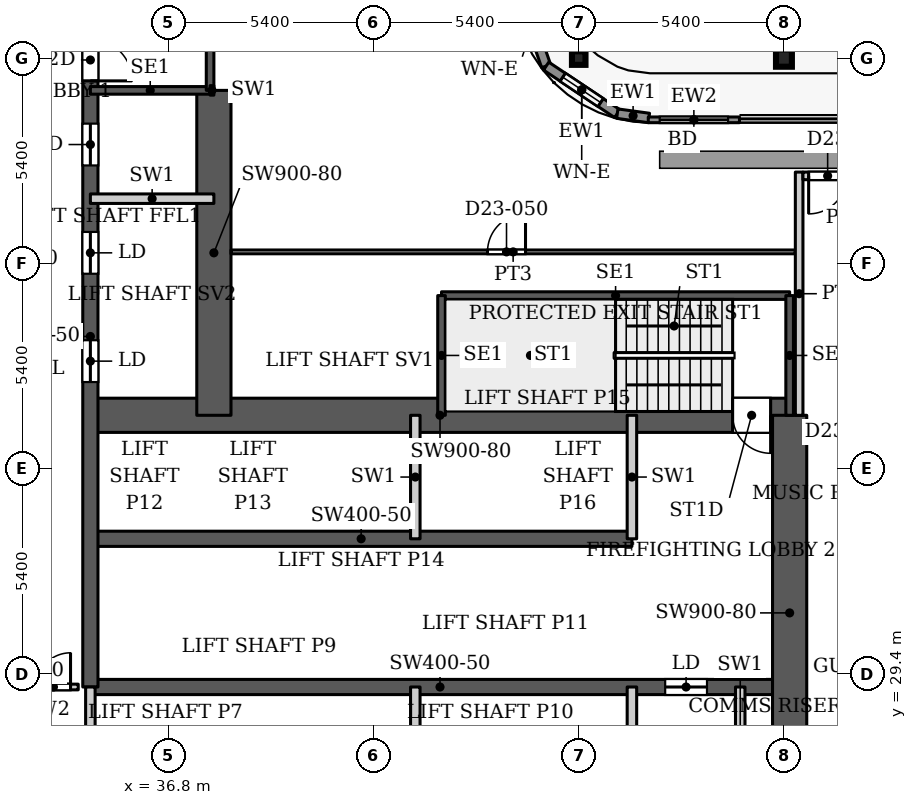
"""IFC4 building model, lengths in metres.
Left out: names, types, materials, properties, quantities, classifications, styles, units other than length and angle.
Written with IfcOpenShell. Run it as: python <this file> out.ifc"""

import sys

from ifc_helpers import new_model, si_unit, direction, frame, frame_2d, origin, origin_2d, place, context, subcontext, project, spatial, rectangle, hollow_rectangle, i_section, extrude, source, transform, mapped, element, fill, save


model = new_model("IFC4")
c1 = context("Model", 3, precision=1e-05, world=origin(), true_north=direction((0.0, 1.0)))
c2 = subcontext(c1, "Body", "Model", "MODEL_VIEW")
j1 = project(units=[si_unit("LENGTHUNIT", "METRE"), si_unit("PLANEANGLEUNIT", "RADIAN")], contexts=[c1])
p1 = place(None, origin())
s1 = spatial("IfcSite", under=j1, at=p1, CompositionType="ELEMENT")
p2 = place(p1, origin())
s2 = spatial("IfcBuilding", under=s1, at=p2, CompositionType="ELEMENT")
p3 = place(p2, frame((0.0, 0.0, 101.9)))
s3 = spatial("IfcBuildingStorey", under=s2, at=p3, CompositionType="ELEMENT", Elevation=101.9)
p4 = place(p3, frame((53.0, 45.6, 0.0), z_axis=(0.0, 0.0, 1.0), x_axis=(1.0, 0.0, 0.0)))
e1 = element("IfcColumn", 1, at=p4, inside=s3, PredefinedType="COLUMN", context=c2, shape_type="SweptSolid", body=[
    extrude(i_section(OverallWidth=0.418, OverallDepth=0.455, WebThickness=0.042, FlangeThickness=0.068, FilletRadius=0.014, at=origin_2d()), origin(), (0.0, 0.0, 1.0), 3.9),
])
p5 = place(p3, frame((47.6, 45.6, 0.0), z_axis=(0.0, 0.0, 1.0), x_axis=(1.0, 0.0, 0.0)))
e2 = element("IfcColumn", 2, at=p5, inside=s3, PredefinedType="COLUMN", context=c2, shape_type="SweptSolid", body=[
    extrude(hollow_rectangle(XDim=0.356, YDim=0.356, WallThickness=0.016, InnerFilletRadius=0.016, OuterFilletRadius=0.032, at=origin_2d()), origin(), (0.0, 0.0, 1.0), 3.9),
])
p6 = place(p3, frame((34.75, 29.05, 0.0), z_axis=(0.0, 0.0, 1.0), x_axis=(1.0, 0.0, 0.0)))
e3 = element("IfcWall", 3, at=p6, inside=s3, PredefinedType="SHEAR", context=c2, shape_type="SweptSolid", body=[
    extrude(rectangle(XDim=18.4, YDim=0.4, at=frame_2d((9.2, 0.0))), origin(), (0.0, 0.0, 1.0), 3.9),
])
p7 = place(p6, frame((15.125, 0.0, 0.0)))
e4 = element("IfcOpeningElement", 4, at=p7, cuts=e3, PredefinedType="OPENING", context=c2, shape_type="SweptSolid", body=[
    extrude(rectangle(XDim=1.1, YDim=2.2, at=frame_2d((0.55, 1.1))), frame((0.0, 0.21, 0.0), z_axis=(0.0, -1.0, 0.0), x_axis=(1.0, 0.0, 0.0)), (0.0, 0.0, 1.0), 0.42),
])
p8 = place(p3, frame((34.75, 32.95, 0.0), z_axis=(0.0, 0.0, 1.0), x_axis=(1.0, 0.0, 0.0)))
e5 = element("IfcWall", 5, at=p8, inside=s3, PredefinedType="SHEAR", context=c2, shape_type="SweptSolid", body=[
    extrude(rectangle(XDim=14.25, YDim=0.4, at=frame_2d((7.125, 0.0))), origin(), (0.0, 0.0, 1.0), 3.9),
])
p9 = place(p3, frame((34.75, 36.2, 0.0), z_axis=(0.0, 0.0, 1.0), x_axis=(1.0, 0.0, 0.0)))
e6 = element("IfcWall", 6, at=p9, inside=s3, PredefinedType="SHEAR", context=c2, shape_type="SweptSolid", body=[
    extrude(rectangle(XDim=18.4, YDim=0.9, at=frame_2d((9.2, 0.0))), origin(), (0.0, 0.0, 1.0), 3.9),
])
p10 = place(p9, frame((16.9, 0.0, 0.0)))
e7 = element("IfcOpeningElement", 7, at=p10, cuts=e6, PredefinedType="OPENING", context=c2, shape_type="SweptSolid", body=[
    extrude(rectangle(XDim=1.0, YDim=2.2, at=frame_2d((0.5, 1.1))), frame((0.0, 0.46, 0.0), z_axis=(0.0, -1.0, 0.0), x_axis=(1.0, 0.0, 0.0)), (0.0, 0.0, 1.0), 0.92),
])
p11 = place(p3, frame((34.75, 29.05, 0.0), z_axis=(0.0, 0.0, 1.0), x_axis=(0.0, 1.0, 0.0)))
e8 = element("IfcWall", 8, at=p11, inside=s3, PredefinedType="SHEAR", context=c2, shape_type="SweptSolid", body=[
    extrude(rectangle(XDim=18.45, YDim=0.4, at=frame_2d((9.225, 0.0))), origin(), (0.0, 0.0, 1.0), 3.9),
])
p12 = place(p11, frame((8.025, 0.0, 0.0)))
e9 = element("IfcOpeningElement", 9, at=p12, cuts=e8, PredefinedType="OPENING", context=c2, shape_type="SweptSolid", body=[
    extrude(rectangle(XDim=1.1, YDim=2.2, at=frame_2d((0.55, 1.1))), frame((0.0, 0.21, 0.0), z_axis=(0.0, -1.0, 0.0), x_axis=(1.0, 0.0, 0.0)), (0.0, 0.0, 1.0), 0.42),
])
p13 = place(p11, frame((10.875, 0.0, 0.0)))
e10 = element("IfcOpeningElement", 10, at=p13, cuts=e8, PredefinedType="OPENING", context=c2, shape_type="SweptSolid", body=[
    extrude(rectangle(XDim=1.1, YDim=2.2, at=frame_2d((0.55, 1.1))), frame((0.0, 0.21, 0.0), z_axis=(0.0, -1.0, 0.0), x_axis=(1.0, 0.0, 0.0)), (0.0, 0.0, 1.0), 0.42),
])
p14 = place(p11, frame((13.725, 0.0, 0.0)))
e11 = element("IfcOpeningElement", 11, at=p14, cuts=e8, PredefinedType="OPENING", context=c2, shape_type="SweptSolid", body=[
    extrude(rectangle(XDim=1.1, YDim=2.2, at=frame_2d((0.55, 1.1))), frame((0.0, 0.21, 0.0), z_axis=(0.0, -1.0, 0.0), x_axis=(1.0, 0.0, 0.0)), (0.0, 0.0, 1.0), 0.42),
])
p15 = place(p11, frame((15.95, 0.0, 0.0)))
e12 = element("IfcOpeningElement", 12, at=p15, cuts=e8, PredefinedType="OPENING", context=c2, shape_type="SweptSolid", body=[
    extrude(rectangle(XDim=1.1, YDim=2.2, at=frame_2d((0.55, 1.1))), frame((0.0, 0.21, 0.0), z_axis=(0.0, -1.0, 0.0), x_axis=(1.0, 0.0, 0.0)), (0.0, 0.0, 1.0), 0.42),
])
p16 = place(p3, frame((38.0, 36.2, 0.0), z_axis=(0.0, 0.0, 1.0), x_axis=(0.0, 1.0, 0.0)))
e13 = element("IfcWall", 13, at=p16, inside=s3, PredefinedType="SHEAR", context=c2, shape_type="SweptSolid", body=[
    extrude(rectangle(XDim=8.55, YDim=0.9, at=frame_2d((4.275, 0.0))), origin(), (0.0, 0.0, 1.0), 3.9),
])
p17 = place(p3, frame((53.15, 25.8, 0.0), z_axis=(0.0, 0.0, 1.0), x_axis=(0.0, 1.0, 0.0)))
e14 = element("IfcWall", 14, at=p17, inside=s3, PredefinedType="SHEAR", context=c2, shape_type="SweptSolid", body=[
    extrude(rectangle(XDim=10.4, YDim=0.9, at=frame_2d((5.2, 0.0))), origin(), (0.0, 0.0, 1.0), 3.9),
])
p18 = place(p3, frame((46.018, 47.471, 0.0), z_axis=(0.0, 0.0, 1.0), x_axis=(0.328791208903, -0.944402637093, 0.0)))
e15 = element("IfcWall", 15, at=p18, inside=s3, PredefinedType="SOLIDWALL", context=c2, shape_type="SweptSolid", body=[
    extrude(rectangle(XDim=2.205, YDim=0.25, at=frame_2d((1.102, 0.0))), origin(), (0.0, 0.0, 1.0), 3.75),
])
p19 = place(p18, frame((0.503, 0.0, 0.6)))
e16 = element("IfcOpeningElement", 16, at=p19, cuts=e15, PredefinedType="OPENING", context=c2, shape_type="SweptSolid", body=[
    extrude(rectangle(XDim=1.2, YDim=2.1, at=frame_2d((0.6, 1.05))), frame((0.0, 0.135, 0.0), z_axis=(0.0, -1.0, 0.0), x_axis=(1.0, 0.0, 0.0)), (0.0, 0.0, 1.0), 0.27),
])
p20 = place(p3, frame((46.743, 45.389, 0.0), z_axis=(0.0, 0.0, 1.0), x_axis=(0.831449265529, -0.555600682912, 0.0)))
e17 = element("IfcWall", 17, at=p20, inside=s3, PredefinedType="SOLIDWALL", context=c2, shape_type="SweptSolid", body=[
    extrude(rectangle(XDim=2.251, YDim=0.25, at=frame_2d((1.126, 0.0))), origin(), (0.0, 0.0, 1.0), 3.75),
])
p21 = place(p20, frame((0.525, 0.0, 0.6)))
e18 = element("IfcOpeningElement", 18, at=p21, cuts=e17, PredefinedType="OPENING", context=c2, shape_type="SweptSolid", body=[
    extrude(rectangle(XDim=1.2, YDim=2.1, at=frame_2d((0.6, 1.05))), frame((0.0, 0.135, 0.0), z_axis=(0.0, -1.0, 0.0), x_axis=(1.0, 0.0, 0.0)), (0.0, 0.0, 1.0), 0.27),
])
p22 = place(p3, frame((48.615, 44.138, 0.0), z_axis=(0.0, 0.0, 1.0), x_axis=(0.990741504246, -0.135761819977, 0.0)))
e19 = element("IfcWall", 19, at=p22, inside=s3, PredefinedType="SOLIDWALL", context=c2, shape_type="SweptSolid", body=[
    extrude(rectangle(XDim=0.84, YDim=0.25, at=frame_2d((0.42, 0.0))), origin(), (0.0, 0.0, 1.0), 3.75),
])
p23 = place(p3, frame((49.43, 43.975, 0.0), z_axis=(0.0, 0.0, 1.0), x_axis=(1.0, 0.0, 0.0)))
e20 = element("IfcWall", 20, at=p23, inside=s3, PredefinedType="SOLIDWALL", context=c2, shape_type="SweptSolid", body=[
    extrude(rectangle(XDim=2.4, YDim=0.15, at=frame_2d((1.2, 0.0))), origin(), (0.0, 0.0, 1.0), 3.75),
])
p24 = place(p23, frame((0.3, 0.0, 0.0)))
e21 = element("IfcOpeningElement", 21, at=p24, cuts=e20, PredefinedType="OPENING", context=c2, shape_type="SweptSolid", body=[
    extrude(rectangle(XDim=1.8, YDim=2.4, at=frame_2d((0.9, 1.2))), frame((0.0, 0.085, 0.0), z_axis=(0.0, -1.0, 0.0), x_axis=(1.0, 0.0, 0.0)), (0.0, 0.0, 1.0), 0.17),
])
p25 = place(p3, frame((43.99, 39.35, 0.0), z_axis=(0.0, 0.0, 1.0), x_axis=(1.0, 0.0, 0.0)))
e22 = element("IfcWall", 22, at=p25, inside=s3, PredefinedType="SHEAR", context=c2, shape_type="SweptSolid", body=[
    extrude(rectangle(XDim=9.16, YDim=0.2, at=frame_2d((4.58, 0.0))), origin(), (0.0, 0.0, 1.0), 3.9),
])
for number, where, z_axis, x_axis in (
    (23, (43.99, 36.2, 0.0), (0.0, 0.0, 1.0), (0.0, 1.0, 0.0)),
    (24, (53.15, 36.2, 0.0), (0.0, 0.0, 1.0), (0.0, 1.0, 0.0)),
):
    element("IfcWall", number, at=place(p3, frame(where, z_axis=z_axis, x_axis=x_axis)), inside=s3, PredefinedType="SHEAR", context=c2, shape_type="SweptSolid", body=[
        extrude(rectangle(XDim=3.15, YDim=0.2, at=frame_2d((1.575, 0.0))), origin(), (0.0, 0.0, 1.0), 3.9),
    ])
p26 = place(p3, frame((34.75, 44.75, 0.0), z_axis=(0.0, 0.0, 1.0), x_axis=(1.0, 0.0, 0.0)))
e25 = element("IfcWall", 25, at=p26, inside=s3, PredefinedType="SHEAR", context=c2, shape_type="SweptSolid", body=[
    extrude(rectangle(XDim=3.15, YDim=0.2, at=frame_2d((1.575, 0.0))), origin(), (0.0, 0.0, 1.0), 3.9),
])
p27 = place(p3, frame((37.9, 44.75, 0.0), z_axis=(0.0, 0.0, 1.0), x_axis=(0.0, 1.0, 0.0)))
e26 = element("IfcWall", 26, at=p27, inside=s3, PredefinedType="SHEAR", context=c2, shape_type="SweptSolid", body=[
    extrude(rectangle(XDim=9.16, YDim=0.2, at=frame_2d((4.58, 0.0))), origin(), (0.0, 0.0, 1.0), 3.9),
])
for number, where, z_axis, x_axis in (
    (27, (34.75, 25.8, 0.0), (0.0, 0.0, 1.0), (0.0, 1.0, 0.0)),
    (28, (43.3, 25.8, 0.0), (0.0, 0.0, 1.0), (0.0, 1.0, 0.0)),
    (29, (43.3, 32.95, 0.0), (0.0, 0.0, 1.0), (0.0, 1.0, 0.0)),
    (30, (49.0, 25.8, 0.0), (0.0, 0.0, 1.0), (0.0, 1.0, 0.0)),
    (31, (49.0, 32.95, 0.0), (0.0, 0.0, 1.0), (0.0, 1.0, 0.0)),
    (32, (51.85, 25.8, 0.0), (0.0, 0.0, 1.0), (0.0, 1.0, 0.0)),
    (33, (34.75, 41.9, 0.0), (0.0, 0.0, 1.0), (1.0, 0.0, 0.0)),
):
    element("IfcWall", number, at=place(p3, frame(where, z_axis=z_axis, x_axis=x_axis)), inside=s3, PredefinedType="PARTITIONING", context=c2, shape_type="SweptSolid", body=[
        extrude(rectangle(XDim=3.25, YDim=0.25, at=frame_2d((1.625, 0.0))), origin(), (0.0, 0.0, 1.0), 3.9),
    ])
p28 = place(p3, frame((37.9, 44.75, 0.0), z_axis=(0.0, 0.0, 1.0), x_axis=(1.0, 0.0, 0.0)))
e34 = element("IfcWall", 34, at=p28, inside=s3, PredefinedType="PARTITIONING", context=c2, shape_type="SweptSolid", body=[
    extrude(rectangle(XDim=0.1, YDim=0.25, at=frame_2d((0.05, 0.0))), origin(), (0.0, 0.0, 1.0), 3.9),
])
p29 = place(p3, frame((32.805, 29.05, 0.0), z_axis=(0.0, 0.0, 1.0), x_axis=(1.0, 0.0, 0.0)))
e35 = element("IfcWall", 35, at=p29, inside=s3, PredefinedType="PARTITIONING", context=c2, shape_type="SweptSolid", body=[
    extrude(rectangle(XDim=1.625, YDim=0.15, at=frame_2d((0.812, 0.0))), origin(), (0.0, 0.0, 1.0), 3.9),
])
p30 = place(p29, frame((0.523, 0.0, 0.0)))
e36 = element("IfcOpeningElement", 36, at=p30, cuts=e35, PredefinedType="OPENING", context=c2, shape_type="SweptSolid", body=[
    extrude(rectangle(XDim=0.9, YDim=2.2, at=frame_2d((0.45, 1.1))), frame((0.0, 0.085, 0.0), z_axis=(0.0, -1.0, 0.0), x_axis=(1.0, 0.0, 0.0)), (0.0, 0.0, 1.0), 0.17),
])
p31 = place(p3, frame((38.449, 40.5, 0.0), z_axis=(0.0, 0.0, 1.0), x_axis=(1.0, 0.0, 0.0)))
e37 = element("IfcWall", 37, at=p31, inside=s3, PredefinedType="PARTITIONING", context=c2, shape_type="SweptSolid", body=[
    extrude(rectangle(XDim=14.851, YDim=0.1, at=frame_2d((7.426, 0.0))), origin(), (0.0, 0.0, 1.0), 3.6),
])
p32 = place(p31, frame((6.751, 0.0, 0.0)))
e38 = element("IfcOpeningElement", 38, at=p32, cuts=e37, PredefinedType="OPENING", context=c2, shape_type="SweptSolid", body=[
    extrude(rectangle(XDim=1.0, YDim=2.1, at=frame_2d((0.5, 1.05))), frame((0.0, 0.06, 0.0), z_axis=(0.0, -1.0, 0.0), x_axis=(1.0, 0.0, 0.0)), (0.0, 0.0, 1.0), 0.12),
])
p33 = place(p3, frame((53.4, 36.199, 0.0), z_axis=(0.0, 0.0, 1.0), x_axis=(0.0, 1.0, 0.0)))
e39 = element("IfcWall", 39, at=p33, inside=s3, PredefinedType="PARTITIONING", context=c2, shape_type="SweptSolid", body=[
    extrude(rectangle(XDim=6.401, YDim=0.2, at=frame_2d((3.201, 0.0))), origin(), (0.0, 0.0, 1.0), 3.6),
])
p34 = place(p3, frame((53.5, 42.5, 0.0), z_axis=(0.0, 0.0, 1.0), x_axis=(1.0, 0.0, 0.0)))
e40 = element("IfcWall", 40, at=p34, inside=s3, PredefinedType="PARTITIONING", context=c2, shape_type="SweptSolid", body=[
    extrude(rectangle(XDim=2.2, YDim=0.2, at=frame_2d((1.1, 0.0))), origin(), (0.0, 0.0, 1.0), 3.6),
])
p35 = place(p34, frame((0.15, 0.0, 0.0)))
e41 = element("IfcOpeningElement", 41, at=p35, cuts=e40, PredefinedType="OPENING", context=c2, shape_type="SweptSolid", body=[
    extrude(rectangle(XDim=1.0, YDim=2.1, at=frame_2d((0.5, 1.05))), frame((0.0, 0.11, 0.0), z_axis=(0.0, -1.0, 0.0), x_axis=(1.0, 0.0, 0.0)), (0.0, 0.0, 1.0), 0.22),
])
m1 = source(origin(), c2, "Body", "SweptSolid", [
    extrude(rectangle(XDim=1.2, YDim=2.1, at=frame_2d((0.6, 1.05))), frame((0.0, 0.03, 0.0), z_axis=(0.0, -1.0, 0.0), x_axis=(1.0, 0.0, 0.0)), (0.0, 0.0, 1.0), 0.06),
])
p36 = place(p21, origin())
e42 = element("IfcWindow", 42, at=p36, inside=s3, PartitioningType="SINGLE_PANEL", PredefinedType="WINDOW", context=c2, shape_type="MappedRepresentation", body=[
    mapped(m1, transform((0.0, 0.0, 0.0), x_axis=(1.0, 0.0, 0.0), y_axis=(0.0, 1.0, 0.0), z_axis=(0.0, 0.0, 1.0), scale=1.0)),
])
fill(e18, e42)
m2 = source(origin(), c2, "Body", "SweptSolid", [
    extrude(rectangle(XDim=1.8, YDim=2.4, at=frame_2d((0.9, 1.2))), frame((0.0, 0.025, 0.0), z_axis=(0.0, -1.0, 0.0), x_axis=(1.0, 0.0, 0.0)), (0.0, 0.0, 1.0), 0.05),
])
p37 = place(p24, origin())
e43 = element("IfcDoor", 43, at=p37, inside=s3, OperationType="SLIDING_TO_LEFT", PredefinedType="DOOR", context=c2, shape_type="MappedRepresentation", body=[
    mapped(m2, transform((0.0, 0.0, 0.0), x_axis=(1.0, 0.0, 0.0), y_axis=(0.0, 1.0, 0.0), z_axis=(0.0, 0.0, 1.0), scale=1.0)),
])
fill(e21, e43)
m3 = source(origin(), c2, "Body", "SweptSolid", [
    extrude(rectangle(XDim=1.1, YDim=2.2, at=frame_2d((0.55, 1.1))), frame((0.0, 0.025, 0.0), z_axis=(0.0, -1.0, 0.0), x_axis=(1.0, 0.0, 0.0)), (0.0, 0.0, 1.0), 0.05),
])
p38 = place(p12, origin())
e44 = element("IfcDoor", 44, at=p38, inside=s3, OperationType="SLIDING_TO_LEFT", PredefinedType="DOOR", context=c2, shape_type="MappedRepresentation", body=[
    mapped(m3, transform((0.0, 0.0, 0.0), x_axis=(1.0, 0.0, 0.0), y_axis=(0.0, 1.0, 0.0), z_axis=(0.0, 0.0, 1.0), scale=1.0)),
])
fill(e9, e44)
p39 = place(p13, origin())
e45 = element("IfcDoor", 45, at=p39, inside=s3, OperationType="SLIDING_TO_LEFT", PredefinedType="DOOR", context=c2, shape_type="MappedRepresentation", body=[
    mapped(m3, transform((0.0, 0.0, 0.0), x_axis=(1.0, 0.0, 0.0), y_axis=(0.0, 1.0, 0.0), z_axis=(0.0, 0.0, 1.0), scale=1.0)),
])
fill(e10, e45)
p40 = place(p14, origin())
e46 = element("IfcDoor", 46, at=p40, inside=s3, OperationType="SLIDING_TO_LEFT", PredefinedType="DOOR", context=c2, shape_type="MappedRepresentation", body=[
    mapped(m3, transform((0.0, 0.0, 0.0), x_axis=(1.0, 0.0, 0.0), y_axis=(0.0, 1.0, 0.0), z_axis=(0.0, 0.0, 1.0), scale=1.0)),
])
fill(e11, e46)
p41 = place(p7, origin())
e47 = element("IfcDoor", 47, at=p41, inside=s3, OperationType="SLIDING_TO_LEFT", PredefinedType="DOOR", context=c2, shape_type="MappedRepresentation", body=[
    mapped(m3, transform((0.0, 0.0, 0.0), x_axis=(1.0, 0.0, 0.0), y_axis=(0.0, 1.0, 0.0), z_axis=(0.0, 0.0, 1.0), scale=1.0)),
])
fill(e4, e47)
m4 = source(origin(), c2, "Body", "SweptSolid", [
    extrude(rectangle(XDim=0.9, YDim=2.2, at=frame_2d((0.45, 1.1))), frame((0.0, 0.025, 0.0), z_axis=(0.0, -1.0, 0.0), x_axis=(1.0, 0.0, 0.0)), (0.0, 0.0, 1.0), 0.05),
])
p42 = place(p30, origin())
e48 = element("IfcDoor", 48, at=p42, inside=s3, OperationType="SINGLE_SWING_LEFT", PredefinedType="DOOR", context=c2, shape_type="MappedRepresentation", body=[
    mapped(m4, transform((0.0, 0.0, 0.0), x_axis=(1.0, 0.0, 0.0), y_axis=(0.0, 1.0, 0.0), z_axis=(0.0, 0.0, 1.0), scale=1.0)),
])
fill(e36, e48)
m5 = source(origin(), c2, "Body", "SweptSolid", [
    extrude(rectangle(XDim=1.0, YDim=2.2, at=frame_2d((0.5, 1.1))), frame((0.0, 0.025, 0.0), z_axis=(0.0, -1.0, 0.0), x_axis=(1.0, 0.0, 0.0)), (0.0, 0.0, 1.0), 0.05),
])
p43 = place(p10, origin())
e49 = element("IfcDoor", 49, at=p43, inside=s3, OperationType="SINGLE_SWING_RIGHT", PredefinedType="DOOR", context=c2, shape_type="MappedRepresentation", body=[
    mapped(m5, transform((0.0, 0.0, 0.0), x_axis=(1.0, 0.0, 0.0), y_axis=(0.0, 1.0, 0.0), z_axis=(0.0, 0.0, 1.0), scale=1.0)),
])
fill(e7, e49)
m6 = source(origin(), c2, "Body", "SweptSolid", [
    extrude(rectangle(XDim=1.1, YDim=2.2, at=frame_2d((0.55, 1.1))), frame((0.0, 0.025, 0.0), z_axis=(0.0, -1.0, 0.0), x_axis=(1.0, 0.0, 0.0)), (0.0, 0.0, 1.0), 0.05),
])
p44 = place(p15, origin())
e50 = element("IfcDoor", 50, at=p44, inside=s3, OperationType="SINGLE_SWING_RIGHT", PredefinedType="DOOR", context=c2, shape_type="MappedRepresentation", body=[
    mapped(m6, transform((0.0, 0.0, 0.0), x_axis=(1.0, 0.0, 0.0), y_axis=(0.0, 1.0, 0.0), z_axis=(0.0, 0.0, 1.0), scale=1.0)),
])
fill(e12, e50)
m7 = source(origin(), c2, "Body", "SweptSolid", [
    extrude(rectangle(XDim=1.0, YDim=2.1, at=frame_2d((0.5, 1.05))), frame((0.0, 0.025, 0.0), z_axis=(0.0, -1.0, 0.0), x_axis=(1.0, 0.0, 0.0)), (0.0, 0.0, 1.0), 0.05),
])
p45 = place(p32, origin())
e51 = element("IfcDoor", 51, at=p45, inside=s3, OperationType="SINGLE_SWING_LEFT", PredefinedType="DOOR", context=c2, shape_type="MappedRepresentation", body=[
    mapped(m7, transform((0.0, 0.0, 0.0), x_axis=(1.0, 0.0, 0.0), y_axis=(0.0, 1.0, 0.0), z_axis=(0.0, 0.0, 1.0), scale=1.0)),
])
fill(e38, e51)
m8 = source(origin(), c2, "Body", "SweptSolid", [
    extrude(rectangle(XDim=1.0, YDim=2.1, at=frame_2d((0.5, 1.05))), frame((0.0, 0.025, 0.0), z_axis=(0.0, -1.0, 0.0), x_axis=(1.0, 0.0, 0.0)), (0.0, 0.0, 1.0), 0.05),
])
p46 = place(p35, origin())
e52 = element("IfcDoor", 52, at=p46, inside=s3, OperationType="SINGLE_SWING_RIGHT", PredefinedType="DOOR", context=c2, shape_type="MappedRepresentation", body=[
    mapped(m8, transform((0.0, 0.0, 0.0), x_axis=(1.0, 0.0, 0.0), y_axis=(0.0, 1.0, 0.0), z_axis=(0.0, 0.0, 1.0), scale=1.0)),
])
fill(e41, e52)
save(model, sys.argv[1])
